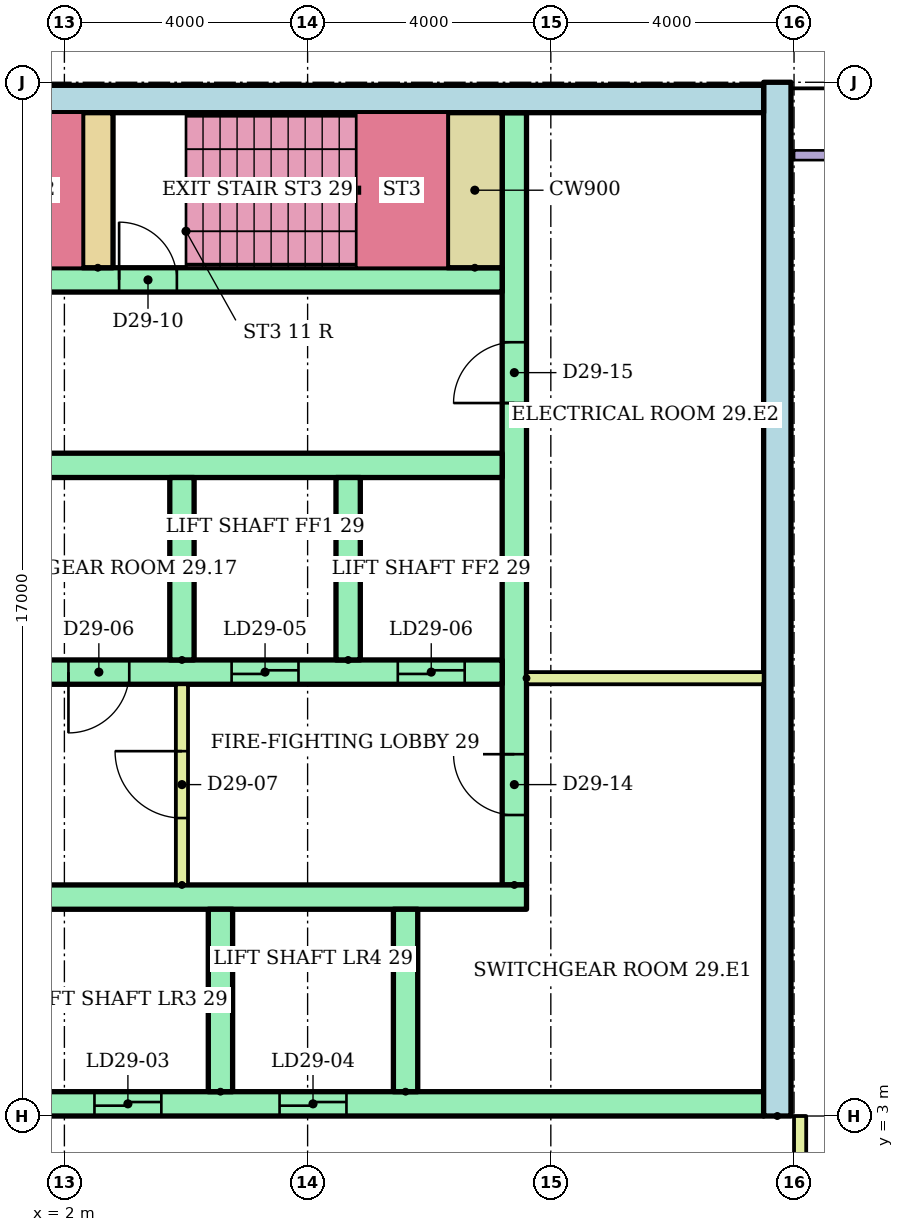
"""IFC4 building model, lengths in metres.
Left out: names, types, materials, properties, quantities, classifications, styles, units other than length and angle.
Written with IfcOpenShell. Run it as: python <this file> out.ifc"""

import sys

from ifc_helpers import new_model, si_unit, direction, frame, frame_2d, origin, place, context, subcontext, project, spatial, rectangle, extrude, element, fill, save


model = new_model("IFC4")
c1 = context("Model", 3, precision=1e-05, world=origin(), true_north=direction((0.0, 1.0)))
c2 = subcontext(c1, "Body", "Model", "MODEL_VIEW")
j1 = project(units=[si_unit("LENGTHUNIT", "METRE"), si_unit("PLANEANGLEUNIT", "RADIAN")], contexts=[c1])
p1 = place(None, origin())
s1 = spatial("IfcSite", under=j1, at=p1, CompositionType="ELEMENT")
p2 = place(p1, origin())
s2 = spatial("IfcBuilding", under=s1, at=p2, CompositionType="ELEMENT")
p3 = place(p2, frame((0.0, 0.0, 115.9)))
s3 = spatial("IfcBuildingStorey", under=s2, at=p3, CompositionType="ELEMENT", Elevation=115.9)
p4 = place(p3, frame((13.725, 3.0, 0.0), z_axis=(0.0, 0.0, 1.0), x_axis=(0.0, 1.0, 0.0)))
e1 = element("IfcWall", 1, at=p4, inside=s3, PredefinedType="SHEAR", context=c2, shape_type="SweptSolid", body=[
    extrude(rectangle(XDim=17.0, YDim=0.45, at=frame_2d((8.5, 0.0))), origin(), (0.0, 0.0, 1.0), 3.62),
])
p5 = place(p3, frame((-13.5, 19.725, 0.0)))
e2 = element("IfcWall", 2, at=p5, inside=s3, PredefinedType="SHEAR", context=c2, shape_type="SweptSolid", body=[
    extrude(rectangle(XDim=27.0, YDim=0.45, at=frame_2d((13.5, 0.0))), origin(), (0.0, 0.0, 1.0), 3.62),
])
p6 = place(p3, frame((9.4, 6.8, 0.0), z_axis=(0.0, 0.0, 1.0), x_axis=(0.0, 1.0, 0.0)))
e3 = element("IfcWall", 3, at=p6, inside=s3, PredefinedType="SHEAR", context=c2, shape_type="SweptSolid", body=[
    extrude(rectangle(XDim=12.7, YDim=0.4, at=frame_2d((6.35, 0.0))), origin(), (0.0, 0.0, 1.0), 3.62),
])
p7 = place(p6, frame((1.15, 0.0, 0.0)))
e4 = element("IfcOpeningElement", 4, at=p7, cuts=e3, PredefinedType="OPENING", context=c2, shape_type="SweptSolid", body=[
    extrude(rectangle(XDim=1.0, YDim=2.1, at=frame_2d((0.5, 1.05))), frame((0.0, 0.21, 0.0), z_axis=(0.0, -1.0, 0.0), x_axis=(1.0, 0.0, 0.0)), (0.0, 0.0, 1.0), 0.42),
])
p8 = place(p6, frame((7.925, 0.0, 0.0)))
e5 = element("IfcOpeningElement", 5, at=p8, cuts=e3, PredefinedType="OPENING", context=c2, shape_type="SweptSolid", body=[
    extrude(rectangle(XDim=1.0, YDim=2.1, at=frame_2d((0.5, 1.05))), frame((0.0, 0.21, 0.0), z_axis=(0.0, -1.0, 0.0), x_axis=(1.0, 0.0, 0.0)), (0.0, 0.0, 1.0), 0.42),
])
p9 = place(p3, frame((-13.5, 3.2, 0.0)))
e6 = element("IfcWall", 6, at=p9, inside=s3, PredefinedType="SHEAR", context=c2, shape_type="SweptSolid", body=[
    extrude(rectangle(XDim=27.0, YDim=0.4, at=frame_2d((13.5, 0.0))), origin(), (0.0, 0.0, 1.0), 3.62),
])
p10 = place(p9, frame((6.861, 0.0, 0.0)))
e7 = element("IfcOpeningElement", 7, at=p10, cuts=e6, PredefinedType="OPENING", context=c2, shape_type="SweptSolid", body=[
    extrude(rectangle(XDim=1.1, YDim=2.1, at=frame_2d((0.55, 1.05))), frame((0.0, 0.21, 0.0), z_axis=(0.0, -1.0, 0.0), x_axis=(1.0, 0.0, 0.0)), (0.0, 0.0, 1.0), 0.42),
])
p11 = place(p9, frame((9.906, 0.0, 0.0)))
e8 = element("IfcOpeningElement", 8, at=p11, cuts=e6, PredefinedType="OPENING", context=c2, shape_type="SweptSolid", body=[
    extrude(rectangle(XDim=1.1, YDim=2.1, at=frame_2d((0.55, 1.05))), frame((0.0, 0.21, 0.0), z_axis=(0.0, -1.0, 0.0), x_axis=(1.0, 0.0, 0.0)), (0.0, 0.0, 1.0), 0.42),
])
p12 = place(p9, frame((15.994, 0.0, 0.0)))
e9 = element("IfcOpeningElement", 9, at=p12, cuts=e6, PredefinedType="OPENING", context=c2, shape_type="SweptSolid", body=[
    extrude(rectangle(XDim=1.1, YDim=2.1, at=frame_2d((0.55, 1.05))), frame((0.0, 0.21, 0.0), z_axis=(0.0, -1.0, 0.0), x_axis=(1.0, 0.0, 0.0)), (0.0, 0.0, 1.0), 0.42),
])
p13 = place(p9, frame((19.039, 0.0, 0.0)))
e10 = element("IfcOpeningElement", 10, at=p13, cuts=e6, PredefinedType="OPENING", context=c2, shape_type="SweptSolid", body=[
    extrude(rectangle(XDim=1.1, YDim=2.1, at=frame_2d((0.55, 1.05))), frame((0.0, 0.21, 0.0), z_axis=(0.0, -1.0, 0.0), x_axis=(1.0, 0.0, 0.0)), (0.0, 0.0, 1.0), 0.42),
])
p14 = place(p9, frame((12.6, 0.0, 0.0)))
e11 = element("IfcOpeningElement", 11, at=p14, cuts=e6, PredefinedType="OPENING", context=c2, shape_type="SweptSolid", body=[
    extrude(rectangle(XDim=1.8, YDim=2.1, at=frame_2d((0.9, 1.05))), frame((0.0, 0.21, 0.0), z_axis=(0.0, -1.0, 0.0), x_axis=(1.0, 0.0, 0.0)), (0.0, 0.0, 1.0), 0.42),
])
p15 = place(p3, frame((1.522, 6.6, 0.0)))
e12 = element("IfcWall", 12, at=p15, inside=s3, PredefinedType="SHEAR", context=c2, shape_type="SweptSolid", body=[
    extrude(rectangle(XDim=8.078, YDim=0.4, at=frame_2d((4.039, 0.0))), origin(), (0.0, 0.0, 1.0), 3.62),
])
for number, where, z_axis, x_axis in (
    (13, (4.567, 3.4, 0.0), (0.0, 0.0, 1.0), (0.0, 1.0, 0.0)),
    (14, (7.611, 3.4, 0.0), (0.0, 0.0, 1.0), (0.0, 1.0, 0.0)),
):
    element("IfcWall", number, at=place(p3, frame(where, z_axis=z_axis, x_axis=x_axis)), inside=s3, PredefinedType="SHEAR", context=c2, shape_type="SweptSolid", body=[
        extrude(rectangle(XDim=3.0, YDim=0.4, at=frame_2d((1.5, 0.0))), origin(), (0.0, 0.0, 1.0), 3.62),
    ])
p16 = place(p3, frame((1.2, 10.3, 0.0)))
e15 = element("IfcWall", 15, at=p16, inside=s3, PredefinedType="SHEAR", context=c2, shape_type="SweptSolid", body=[
    extrude(rectangle(XDim=8.0, YDim=0.4, at=frame_2d((4.0, 0.0))), origin(), (0.0, 0.0, 1.0), 3.62),
])
p17 = place(p16, frame((3.55, 0.0, 0.0)))
e16 = element("IfcOpeningElement", 16, at=p17, cuts=e15, PredefinedType="OPENING", context=c2, shape_type="SweptSolid", body=[
    extrude(rectangle(XDim=1.1, YDim=2.1, at=frame_2d((0.55, 1.05))), frame((0.0, 0.21, 0.0), z_axis=(0.0, -1.0, 0.0), x_axis=(1.0, 0.0, 0.0)), (0.0, 0.0, 1.0), 0.42),
])
p18 = place(p16, frame((6.283, 0.0, 0.0)))
e17 = element("IfcOpeningElement", 17, at=p18, cuts=e15, PredefinedType="OPENING", context=c2, shape_type="SweptSolid", body=[
    extrude(rectangle(XDim=1.1, YDim=2.1, at=frame_2d((0.55, 1.05))), frame((0.0, 0.21, 0.0), z_axis=(0.0, -1.0, 0.0), x_axis=(1.0, 0.0, 0.0)), (0.0, 0.0, 1.0), 0.42),
])
p19 = place(p16, frame((0.867, 0.0, 0.0)))
e18 = element("IfcOpeningElement", 18, at=p19, cuts=e15, PredefinedType="OPENING", context=c2, shape_type="SweptSolid", body=[
    extrude(rectangle(XDim=1.0, YDim=2.1, at=frame_2d((0.5, 1.05))), frame((0.0, 0.21, 0.0), z_axis=(0.0, -1.0, 0.0), x_axis=(1.0, 0.0, 0.0)), (0.0, 0.0, 1.0), 0.42),
])
p20 = place(p3, frame((1.2, 13.7, 0.0)))
e19 = element("IfcWall", 19, at=p20, inside=s3, PredefinedType="SHEAR", context=c2, shape_type="SweptSolid", body=[
    extrude(rectangle(XDim=8.0, YDim=0.4, at=frame_2d((4.0, 0.0))), origin(), (0.0, 0.0, 1.0), 3.62),
])
for number, where, z_axis, x_axis in (
    (20, (3.933, 10.5, 0.0), (0.0, 0.0, 1.0), (0.0, 1.0, 0.0)),
    (21, (6.667, 10.5, 0.0), (0.0, 0.0, 1.0), (0.0, 1.0, 0.0)),
):
    element("IfcWall", number, at=place(p3, frame(where, z_axis=z_axis, x_axis=x_axis)), inside=s3, PredefinedType="SHEAR", context=c2, shape_type="SweptSolid", body=[
        extrude(rectangle(XDim=3.0, YDim=0.4, at=frame_2d((1.5, 0.0))), origin(), (0.0, 0.0, 1.0), 3.62),
    ])
p21 = place(p3, frame((3.933, 6.8, 0.0), z_axis=(0.0, 0.0, 1.0), x_axis=(0.0, 1.0, 0.0)))
e22 = element("IfcWall", 22, at=p21, inside=s3, PredefinedType="PARTITIONING", context=c2, shape_type="SweptSolid", body=[
    extrude(rectangle(XDim=3.3, YDim=0.2, at=frame_2d((1.65, 0.0))), origin(), (0.0, 0.0, 1.0), 3.62),
])
p22 = place(p21, frame((1.1, 0.0, 0.0)))
e23 = element("IfcOpeningElement", 23, at=p22, cuts=e22, PredefinedType="OPENING", context=c2, shape_type="SweptSolid", body=[
    extrude(rectangle(XDim=1.1, YDim=2.1, at=frame_2d((0.55, 1.05))), frame((0.0, 0.11, 0.0), z_axis=(0.0, -1.0, 0.0), x_axis=(1.0, 0.0, 0.0)), (0.0, 0.0, 1.0), 0.22),
])
p23 = place(p3, frame((-9.2, 16.75, 0.0)))
e24 = element("IfcWall", 24, at=p23, inside=s3, PredefinedType="SHEAR", context=c2, shape_type="SweptSolid", body=[
    extrude(rectangle(XDim=18.4, YDim=0.4, at=frame_2d((9.2, 0.0))), origin(), (0.0, 0.0, 1.0), 3.62),
])
p24 = place(p23, frame((0.1, 0.0, 0.0)))
e25 = element("IfcOpeningElement", 25, at=p24, cuts=e24, PredefinedType="OPENING", context=c2, shape_type="SweptSolid", body=[
    extrude(rectangle(XDim=0.95, YDim=2.1, at=frame_2d((0.475, 1.05))), frame((0.0, 0.21, 0.0), z_axis=(0.0, -1.0, 0.0), x_axis=(1.0, 0.0, 0.0)), (0.0, 0.0, 1.0), 0.42),
])
p25 = place(p23, frame((6.1, 0.0, 0.0)))
e26 = element("IfcOpeningElement", 26, at=p25, cuts=e24, PredefinedType="OPENING", context=c2, shape_type="SweptSolid", body=[
    extrude(rectangle(XDim=0.95, YDim=2.1, at=frame_2d((0.475, 1.05))), frame((0.0, 0.21, 0.0), z_axis=(0.0, -1.0, 0.0), x_axis=(1.0, 0.0, 0.0)), (0.0, 0.0, 1.0), 0.42),
])
p26 = place(p23, frame((12.1, 0.0, 0.0)))
e27 = element("IfcOpeningElement", 27, at=p26, cuts=e24, PredefinedType="OPENING", context=c2, shape_type="SweptSolid", body=[
    extrude(rectangle(XDim=0.95, YDim=2.1, at=frame_2d((0.475, 1.05))), frame((0.0, 0.21, 0.0), z_axis=(0.0, -1.0, 0.0), x_axis=(1.0, 0.0, 0.0)), (0.0, 0.0, 1.0), 0.42),
])
p27 = place(p3, frame((2.55, 16.95, 0.0), z_axis=(0.0, 0.0, 1.0), x_axis=(0.0, 1.0, 0.0)))
e28 = element("IfcWall", 28, at=p27, inside=s3, PredefinedType="SHEAR", context=c2, shape_type="SweptSolid", body=[
    extrude(rectangle(XDim=2.55, YDim=0.5, at=frame_2d((1.275, 0.0))), origin(), (0.0, 0.0, 1.0), 3.62),
])
p28 = place(p3, frame((8.75, 16.95, 0.0), z_axis=(0.0, 0.0, 1.0), x_axis=(0.0, 1.0, 0.0)))
e29 = element("IfcWall", 29, at=p28, inside=s3, PredefinedType="SHEAR", context=c2, shape_type="SweptSolid", body=[
    extrude(rectangle(XDim=2.55, YDim=0.9, at=frame_2d((1.275, 0.0))), origin(), (0.0, 0.0, 1.0), 3.62),
])
p29 = place(p3, frame((9.6, 10.2, 0.0)))
e30 = element("IfcWall", 30, at=p29, inside=s3, PredefinedType="PARTITIONING", context=c2, shape_type="SweptSolid", body=[
    extrude(rectangle(XDim=3.9, YDim=0.2, at=frame_2d((1.95, 0.0))), origin(), (0.0, 0.0, 1.0), 3.62),
])
p30 = place(p3, frame((14.1, 1.5, 0.0), z_axis=(0.0, 0.0, 1.0), x_axis=(0.0, 1.0, 0.0)))
e31 = element("IfcWall", 31, at=p30, inside=s3, PredefinedType="PARTITIONING", context=c2, shape_type="SweptSolid", body=[
    extrude(rectangle(XDim=1.5, YDim=0.2, at=frame_2d((0.75, 0.0))), origin(), (0.0, 0.0, 1.0), 3.62),
])
p31 = place(p12, origin())
e32 = element("IfcDoor", 32, at=p31, inside=s3, OperationType="SLIDING_TO_LEFT", PredefinedType="DOOR", context=c2, shape_type="SweptSolid", body=[
    extrude(rectangle(XDim=1.1, YDim=2.1, at=frame_2d((0.55, 1.05))), frame((0.0, 0.025, 0.0), z_axis=(0.0, -1.0, 0.0), x_axis=(1.0, 0.0, 0.0)), (0.0, 0.0, 1.0), 0.05),
])
fill(e9, e32)
p32 = place(p13, origin())
e33 = element("IfcDoor", 33, at=p32, inside=s3, OperationType="SLIDING_TO_LEFT", PredefinedType="DOOR", context=c2, shape_type="SweptSolid", body=[
    extrude(rectangle(XDim=1.1, YDim=2.1, at=frame_2d((0.55, 1.05))), frame((0.0, 0.025, 0.0), z_axis=(0.0, -1.0, 0.0), x_axis=(1.0, 0.0, 0.0)), (0.0, 0.0, 1.0), 0.05),
])
fill(e10, e33)
p33 = place(p17, origin())
e34 = element("IfcDoor", 34, at=p33, inside=s3, OperationType="SLIDING_TO_LEFT", PredefinedType="DOOR", context=c2, shape_type="SweptSolid", body=[
    extrude(rectangle(XDim=1.1, YDim=2.1, at=frame_2d((0.55, 1.05))), frame((0.0, 0.025, 0.0), z_axis=(0.0, -1.0, 0.0), x_axis=(1.0, 0.0, 0.0)), (0.0, 0.0, 1.0), 0.05),
])
fill(e16, e34)
p34 = place(p18, origin())
e35 = element("IfcDoor", 35, at=p34, inside=s3, OperationType="SLIDING_TO_LEFT", PredefinedType="DOOR", context=c2, shape_type="SweptSolid", body=[
    extrude(rectangle(XDim=1.1, YDim=2.1, at=frame_2d((0.55, 1.05))), frame((0.0, 0.025, 0.0), z_axis=(0.0, -1.0, 0.0), x_axis=(1.0, 0.0, 0.0)), (0.0, 0.0, 1.0), 0.05),
])
fill(e17, e35)
p35 = place(p19, frame((1.0, 0.0, 0.0), z_axis=(0.0, 0.0, 1.0), x_axis=(-1.0, 0.0, 0.0)))
e36 = element("IfcDoor", 36, at=p35, inside=s3, OperationType="SINGLE_SWING_LEFT", PredefinedType="DOOR", context=c2, shape_type="SweptSolid", body=[
    extrude(rectangle(XDim=1.0, YDim=2.1, at=frame_2d((0.5, 1.05))), frame((0.0, 0.025, 0.0), z_axis=(0.0, -1.0, 0.0), x_axis=(1.0, 0.0, 0.0)), (0.0, 0.0, 1.0), 0.05),
])
fill(e18, e36)
p36 = place(p22, origin())
e37 = element("IfcDoor", 37, at=p36, inside=s3, OperationType="SINGLE_SWING_RIGHT", PredefinedType="DOOR", context=c2, shape_type="SweptSolid", body=[
    extrude(rectangle(XDim=1.1, YDim=2.1, at=frame_2d((0.55, 1.05))), frame((0.0, 0.025, 0.0), z_axis=(0.0, -1.0, 0.0), x_axis=(1.0, 0.0, 0.0)), (0.0, 0.0, 1.0), 0.05),
])
fill(e23, e37)
p37 = place(p26, origin())
e38 = element("IfcDoor", 38, at=p37, inside=s3, OperationType="SINGLE_SWING_LEFT", PredefinedType="DOOR", context=c2, shape_type="SweptSolid", body=[
    extrude(rectangle(XDim=0.95, YDim=2.1, at=frame_2d((0.475, 1.05))), frame((0.0, 0.025, 0.0), z_axis=(0.0, -1.0, 0.0), x_axis=(1.0, 0.0, 0.0)), (0.0, 0.0, 1.0), 0.05),
])
fill(e27, e38)
p38 = place(p7, origin())
e39 = element("IfcDoor", 39, at=p38, inside=s3, OperationType="SINGLE_SWING_RIGHT", PredefinedType="DOOR", context=c2, shape_type="SweptSolid", body=[
    extrude(rectangle(XDim=1.0, YDim=2.1, at=frame_2d((0.5, 1.05))), frame((0.0, 0.025, 0.0), z_axis=(0.0, -1.0, 0.0), x_axis=(1.0, 0.0, 0.0)), (0.0, 0.0, 1.0), 0.05),
])
fill(e4, e39)
p39 = place(p8, origin())
e40 = element("IfcDoor", 40, at=p39, inside=s3, OperationType="SINGLE_SWING_LEFT", PredefinedType="DOOR", context=c2, shape_type="SweptSolid", body=[
    extrude(rectangle(XDim=1.0, YDim=2.1, at=frame_2d((0.5, 1.05))), frame((0.0, 0.025, 0.0), z_axis=(0.0, -1.0, 0.0), x_axis=(1.0, 0.0, 0.0)), (0.0, 0.0, 1.0), 0.05),
])
fill(e5, e40)
save(model, sys.argv[1])
